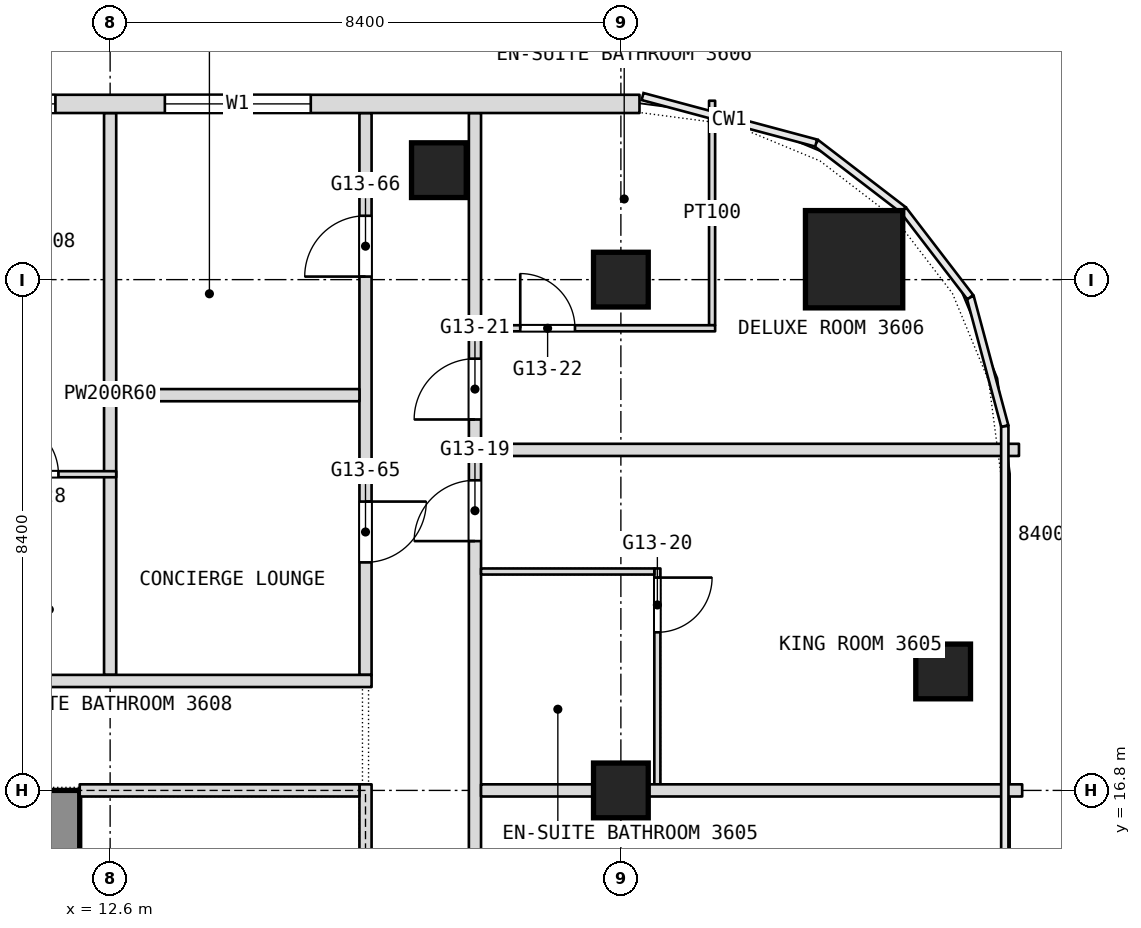
"""IFC4 building model, lengths in metres.
Left out: names, types, materials, properties, quantities, classifications, styles, units other than length and angle.
Written with IfcOpenShell. Run it as: python <this file> out.ifc"""

import sys

from ifc_helpers import new_model, si_unit, direction, frame, frame_2d, origin, origin_2d, place, context, subcontext, project, spatial, rectangle, extrude, element, fill, save


model = new_model("IFC4")
c1 = context("Model", 3, precision=1e-05, world=origin(), true_north=direction((0.0, 1.0)))
c2 = subcontext(c1, "Body", "Model", "MODEL_VIEW")
j1 = project(units=[si_unit("LENGTHUNIT", "METRE"), si_unit("PLANEANGLEUNIT", "RADIAN")], contexts=[c1])
p1 = place(None, origin())
s1 = spatial("IfcSite", under=j1, at=p1, CompositionType="ELEMENT")
p2 = place(p1, origin())
s2 = spatial("IfcBuilding", under=s1, at=p2, CompositionType="ELEMENT")
p3 = place(p2, frame((0.0, 0.0, 155.3)))
s3 = spatial("IfcBuildingStorey", under=s2, at=p3, CompositionType="ELEMENT", Elevation=155.3)
p4 = place(p3, frame((11.6, 0.0, 0.0), z_axis=(0.0, 0.0, 1.0), x_axis=(0.0, 1.0, 0.0)))
e1 = element("IfcWall", 1, at=p4, inside=s3, PredefinedType="SHEAR", context=c2, shape_type="SweptSolid", body=[
    extrude(rectangle(XDim=16.8, YDim=1.0, at=frame_2d((8.4, 0.0))), origin(), (0.0, 0.0, 1.0), 3.6),
])
p5 = place(p4, frame((2.3, 0.0, 0.0)))
e2 = element("IfcOpeningElement", 2, at=p5, cuts=e1, PredefinedType="OPENING", context=c2, shape_type="SweptSolid", body=[
    extrude(rectangle(XDim=1.1, YDim=2.1, at=frame_2d((0.55, 1.05))), frame((0.0, 0.5, 0.0), z_axis=(0.0, -1.0, 0.0), x_axis=(1.0, 0.0, 0.0)), (0.0, 0.0, 1.0), 1.0),
])
p6 = place(p4, frame((4.85, 0.0, 0.0)))
e3 = element("IfcOpeningElement", 3, at=p6, cuts=e1, PredefinedType="OPENING", context=c2, shape_type="SweptSolid", body=[
    extrude(rectangle(XDim=1.1, YDim=2.1, at=frame_2d((0.55, 1.05))), frame((0.0, 0.5, 0.0), z_axis=(0.0, -1.0, 0.0), x_axis=(1.0, 0.0, 0.0)), (0.0, 0.0, 1.0), 1.0),
])
p7 = place(p4, frame((6.825, 0.0, 0.0)))
e4 = element("IfcOpeningElement", 4, at=p7, cuts=e1, PredefinedType="OPENING", context=c2, shape_type="SweptSolid", body=[
    extrude(rectangle(XDim=1.2, YDim=2.1, at=frame_2d((0.6, 1.05))), frame((0.0, 0.5, 0.0), z_axis=(0.0, -1.0, 0.0), x_axis=(1.0, 0.0, 0.0)), (0.0, 0.0, 1.0), 1.0),
])
p8 = place(p4, frame((13.4, 0.0, 0.0)))
e5 = element("IfcOpeningElement", 5, at=p8, cuts=e1, PredefinedType="OPENING", context=c2, shape_type="SweptSolid", body=[
    extrude(rectangle(XDim=1.1, YDim=2.1, at=frame_2d((0.55, 1.05))), frame((0.0, 0.5, 0.0), z_axis=(0.0, -1.0, 0.0), x_axis=(1.0, 0.0, 0.0)), (0.0, 0.0, 1.0), 1.0),
])
p9 = place(p4, frame((10.85, 0.0, 0.0)))
e6 = element("IfcOpeningElement", 6, at=p9, cuts=e1, PredefinedType="OPENING", context=c2, shape_type="SweptSolid", body=[
    extrude(rectangle(XDim=1.1, YDim=2.1, at=frame_2d((0.55, 1.05))), frame((0.0, 0.5, 0.0), z_axis=(0.0, -1.0, 0.0), x_axis=(1.0, 0.0, 0.0)), (0.0, 0.0, 1.0), 1.0),
])
p10 = place(p4, frame((8.775, 0.0, 0.0)))
e7 = element("IfcOpeningElement", 7, at=p10, cuts=e1, PredefinedType="OPENING", context=c2, shape_type="SweptSolid", body=[
    extrude(rectangle(XDim=1.2, YDim=2.1, at=frame_2d((0.6, 1.05))), frame((0.0, 0.5, 0.0), z_axis=(0.0, -1.0, 0.0), x_axis=(1.0, 0.0, 0.0)), (0.0, 0.0, 1.0), 1.0),
])
p11 = place(p3, frame((24.835, 25.535, 0.0), z_axis=(0.0, 0.0, 1.0), x_axis=(1.0, 0.0, 0.0)))
e8 = element("IfcColumn", 8, at=p11, inside=s3, PredefinedType="COLUMN", context=c2, shape_type="SweptSolid", body=[
    extrude(rectangle(XDim=1.6, YDim=1.6, at=origin_2d()), origin(), (0.0, 0.0, 1.0), 3.6),
])
for number, where, z_axis, x_axis in (
    (9, (21.0, 16.8, 0.0), (0.0, 0.0, 1.0), (1.0, 0.0, 0.0)),
    (10, (21.0, 25.2, 0.0), (0.0, 0.0, 1.0), (1.0, 0.0, 0.0)),
    (11, (18.007, 27.0, 0.0), (0.0, 0.0, 1.0), (1.0, 0.0, 0.0)),
    (12, (26.3, 18.756, 0.0), (0.0, 0.0, 1.0), (1.0, 0.0, 0.0)),
):
    element("IfcColumn", number, at=place(p3, frame(where, z_axis=z_axis, x_axis=x_axis)), inside=s3, PredefinedType="COLUMN", context=c2, shape_type="SweptSolid", body=[
        extrude(rectangle(XDim=0.9, YDim=0.9, at=origin_2d()), origin(), (0.0, 0.0, 1.0), 3.6),
    ])
p12 = place(p3, frame((22.5, 24.45, 0.0), z_axis=(0.0, 0.0, 1.0), x_axis=(0.0, 1.0, 0.0)))
e13 = element("IfcWall", 13, at=p12, inside=s3, PredefinedType="PARTITIONING", context=c2, shape_type="SweptSolid", body=[
    extrude(rectangle(XDim=3.692, YDim=0.1, at=frame_2d((1.846, 0.0))), origin(), (0.0, 0.0, 1.0), 3.34),
])
p13 = place(p3, frame((21.6, 16.9, 0.0), z_axis=(0.0, 0.0, 1.0), x_axis=(0.0, 1.0, 0.0)))
e14 = element("IfcWall", 14, at=p13, inside=s3, PredefinedType="PARTITIONING", context=c2, shape_type="SweptSolid", body=[
    extrude(rectangle(XDim=3.55, YDim=0.1, at=frame_2d((1.775, 0.0))), origin(), (0.0, 0.0, 1.0), 3.34),
])
p14 = place(p13, frame((2.5, 0.0, 0.0)))
e15 = element("IfcOpeningElement", 15, at=p14, cuts=e14, PredefinedType="OPENING", context=c2, shape_type="SweptSolid", body=[
    extrude(rectangle(XDim=0.9, YDim=2.1, at=frame_2d((0.45, 1.05))), frame((0.0, 0.05, 0.0), z_axis=(0.0, -1.0, 0.0), x_axis=(1.0, 0.0, 0.0)), (0.0, 0.0, 1.0), 0.1),
])
p15 = place(p3, frame((18.6, -21.708, 0.0), z_axis=(0.0, 0.0, 1.0), x_axis=(0.0, 1.0, 0.0)))
e16 = element("IfcWall", 16, at=p15, inside=s3, PredefinedType="PARTITIONING", context=c2, shape_type="SweptSolid", body=[
    extrude(rectangle(XDim=49.648, YDim=0.2, at=frame_2d((24.824, 0.0))), origin(), (0.0, 0.0, 1.0), 3.34),
])
p16 = place(p15, frame((2.8, 0.0, 0.0)))
e17 = element("IfcOpeningElement", 17, at=p16, cuts=e16, PredefinedType="OPENING", context=c2, shape_type="SweptSolid", body=[
    extrude(rectangle(XDim=1.0, YDim=2.1, at=frame_2d((0.5, 1.05))), frame((0.0, 0.1, 0.0), z_axis=(0.0, -1.0, 0.0), x_axis=(1.0, 0.0, 0.0)), (0.0, 0.0, 1.0), 0.2),
])
p17 = place(p15, frame((10.658, 0.0, 0.0)))
e18 = element("IfcOpeningElement", 18, at=p17, cuts=e16, PredefinedType="OPENING", context=c2, shape_type="SweptSolid", body=[
    extrude(rectangle(XDim=1.1, YDim=2.1, at=frame_2d((0.55, 1.05))), frame((0.0, 0.1, 0.0), z_axis=(0.0, -1.0, 0.0), x_axis=(1.0, 0.0, 0.0)), (0.0, 0.0, 1.0), 0.2),
])
p18 = place(p15, frame((16.608, 0.0, 0.0)))
e19 = element("IfcOpeningElement", 19, at=p18, cuts=e16, PredefinedType="OPENING", context=c2, shape_type="SweptSolid", body=[
    extrude(rectangle(XDim=1.8, YDim=2.1, at=frame_2d((0.9, 1.05))), frame((0.0, 0.1, 0.0), z_axis=(0.0, -1.0, 0.0), x_axis=(1.0, 0.0, 0.0)), (0.0, 0.0, 1.0), 0.2),
])
p19 = place(p15, frame((24.508, 0.0, 0.0)))
e20 = element("IfcOpeningElement", 20, at=p19, cuts=e16, PredefinedType="OPENING", context=c2, shape_type="SweptSolid", body=[
    extrude(rectangle(XDim=1.0, YDim=2.1, at=frame_2d((0.5, 1.05))), frame((0.0, 0.1, 0.0), z_axis=(0.0, -1.0, 0.0), x_axis=(1.0, 0.0, 0.0)), (0.0, 0.0, 1.0), 0.2),
])
p20 = place(p15, frame((26.308, 0.0, 0.0)))
e21 = element("IfcOpeningElement", 21, at=p20, cuts=e16, PredefinedType="OPENING", context=c2, shape_type="SweptSolid", body=[
    extrude(rectangle(XDim=1.0, YDim=2.1, at=frame_2d((0.5, 1.05))), frame((0.0, 0.1, 0.0), z_axis=(0.0, -1.0, 0.0), x_axis=(1.0, 0.0, 0.0)), (0.0, 0.0, 1.0), 0.2),
])
p21 = place(p15, frame((33.408, 0.0, 0.0)))
e22 = element("IfcOpeningElement", 22, at=p21, cuts=e16, PredefinedType="OPENING", context=c2, shape_type="SweptSolid", body=[
    extrude(rectangle(XDim=1.8, YDim=2.1, at=frame_2d((0.9, 1.05))), frame((0.0, 0.1, 0.0), z_axis=(0.0, -1.0, 0.0), x_axis=(1.0, 0.0, 0.0)), (0.0, 0.0, 1.0), 0.2),
])
p22 = place(p15, frame((42.608, 0.0, 0.0)))
e23 = element("IfcOpeningElement", 23, at=p22, cuts=e16, PredefinedType="OPENING", context=c2, shape_type="SweptSolid", body=[
    extrude(rectangle(XDim=1.0, YDim=2.1, at=frame_2d((0.5, 1.05))), frame((0.0, 0.1, 0.0), z_axis=(0.0, -1.0, 0.0), x_axis=(1.0, 0.0, 0.0)), (0.0, 0.0, 1.0), 0.2),
])
p23 = place(p15, frame((44.608, 0.0, 0.0)))
e24 = element("IfcOpeningElement", 24, at=p23, cuts=e16, PredefinedType="OPENING", context=c2, shape_type="SweptSolid", body=[
    extrude(rectangle(XDim=1.0, YDim=2.1, at=frame_2d((0.5, 1.05))), frame((0.0, 0.1, 0.0), z_axis=(0.0, -1.0, 0.0), x_axis=(1.0, 0.0, 0.0)), (0.0, 0.0, 1.0), 0.2),
])
p24 = place(p3, frame((16.8, 18.7, 0.0), z_axis=(0.0, 0.0, 1.0), x_axis=(0.0, 1.0, 0.0)))
e25 = element("IfcWall", 25, at=p24, inside=s3, PredefinedType="PARTITIONING", context=c2, shape_type="SweptSolid", body=[
    extrude(rectangle(XDim=9.24, YDim=0.2, at=frame_2d((4.62, 0.0))), origin(), (0.0, 0.0, 1.0), 3.34),
])
p25 = place(p24, frame((1.85, 0.0, 0.0)))
e26 = element("IfcOpeningElement", 26, at=p25, cuts=e25, PredefinedType="OPENING", context=c2, shape_type="SweptSolid", body=[
    extrude(rectangle(XDim=1.0, YDim=2.1, at=frame_2d((0.5, 1.05))), frame((0.0, 0.1, 0.0), z_axis=(0.0, -1.0, 0.0), x_axis=(1.0, 0.0, 0.0)), (0.0, 0.0, 1.0), 0.2),
])
p26 = place(p24, frame((6.55, 0.0, 0.0)))
e27 = element("IfcOpeningElement", 27, at=p26, cuts=e25, PredefinedType="OPENING", context=c2, shape_type="SweptSolid", body=[
    extrude(rectangle(XDim=1.0, YDim=2.1, at=frame_2d((0.5, 1.05))), frame((0.0, 0.1, 0.0), z_axis=(0.0, -1.0, 0.0), x_axis=(1.0, 0.0, 0.0)), (0.0, 0.0, 1.0), 0.2),
])
p27 = place(p3, frame((12.6, 18.7, 0.0), z_axis=(0.0, 0.0, 1.0), x_axis=(0.0, 1.0, 0.0)))
e28 = element("IfcWall", 28, at=p27, inside=s3, PredefinedType="PARTITIONING", context=c2, shape_type="SweptSolid", body=[
    extrude(rectangle(XDim=9.24, YDim=0.2, at=frame_2d((4.62, 0.0))), origin(), (0.0, 0.0, 1.0), 3.34),
])
p28 = place(p3, frame((18.7, 16.8, 0.0), z_axis=(0.0, 0.0, 1.0), x_axis=(1.0, 0.0, 0.0)))
e29 = element("IfcWall", 29, at=p28, inside=s3, PredefinedType="PARTITIONING", context=c2, shape_type="SweptSolid", body=[
    extrude(rectangle(XDim=8.9, YDim=0.2, at=frame_2d((4.45, 0.0))), origin(), (0.0, 0.0, 1.0), 2.89),
])
p29 = place(p3, frame((10.7, 18.6, 0.0), z_axis=(0.0, 0.0, 1.0), x_axis=(1.0, 0.0, 0.0)))
e30 = element("IfcWall", 30, at=p29, inside=s3, PredefinedType="PARTITIONING", context=c2, shape_type="SweptSolid", body=[
    extrude(rectangle(XDim=6.2, YDim=0.2, at=frame_2d((3.1, 0.0))), origin(), (0.0, 0.0, 1.0), 3.34),
])
p30 = place(p3, frame((18.7, 20.4, 0.0), z_axis=(0.0, 0.0, 1.0), x_axis=(1.0, 0.0, 0.0)))
e31 = element("IfcWall", 31, at=p30, inside=s3, PredefinedType="PARTITIONING", context=c2, shape_type="SweptSolid", body=[
    extrude(rectangle(XDim=2.85, YDim=0.1, at=frame_2d((1.425, 0.0))), origin(), (0.0, 0.0, 1.0), 3.34),
])
p31 = place(p3, frame((10.7, 22.0, 0.0), z_axis=(0.0, 0.0, 1.0), x_axis=(1.0, 0.0, 0.0)))
e32 = element("IfcWall", 32, at=p31, inside=s3, PredefinedType="PARTITIONING", context=c2, shape_type="SweptSolid", body=[
    extrude(rectangle(XDim=2.0, YDim=0.1, at=frame_2d((1.0, 0.0))), origin(), (0.0, 0.0, 1.0), 3.34),
])
p32 = place(p31, frame((0.15, 0.0, 0.0)))
e33 = element("IfcOpeningElement", 33, at=p32, cuts=e32, PredefinedType="OPENING", context=c2, shape_type="SweptSolid", body=[
    extrude(rectangle(XDim=0.9, YDim=2.1, at=frame_2d((0.45, 1.05))), frame((0.0, 0.05, 0.0), z_axis=(0.0, -1.0, 0.0), x_axis=(1.0, 0.0, 0.0)), (0.0, 0.0, 1.0), 0.1),
])
p33 = place(p3, frame((18.7, 22.4, 0.0), z_axis=(0.0, 0.0, 1.0), x_axis=(1.0, 0.0, 0.0)))
e34 = element("IfcWall", 34, at=p33, inside=s3, PredefinedType="PARTITIONING", context=c2, shape_type="SweptSolid", body=[
    extrude(rectangle(XDim=8.847, YDim=0.2, at=frame_2d((4.424, 0.0))), origin(), (0.0, 0.0, 1.0), 3.34),
])
p34 = place(p3, frame((12.7, 23.3, 0.0), z_axis=(0.0, 0.0, 1.0), x_axis=(1.0, 0.0, 0.0)))
e35 = element("IfcWall", 35, at=p34, inside=s3, PredefinedType="PARTITIONING", context=c2, shape_type="SweptSolid", body=[
    extrude(rectangle(XDim=4.0, YDim=0.2, at=frame_2d((2.0, 0.0))), origin(), (0.0, 0.0, 1.0), 3.34),
])
p35 = place(p3, frame((18.7, 24.4, 0.0), z_axis=(0.0, 0.0, 1.0), x_axis=(1.0, 0.0, 0.0)))
e36 = element("IfcWall", 36, at=p35, inside=s3, PredefinedType="PARTITIONING", context=c2, shape_type="SweptSolid", body=[
    extrude(rectangle(XDim=3.85, YDim=0.1, at=frame_2d((1.925, 0.0))), origin(), (0.0, 0.0, 1.0), 3.34),
])
p36 = place(p35, frame((0.645, 0.0, 0.0)))
e37 = element("IfcOpeningElement", 37, at=p36, cuts=e36, PredefinedType="OPENING", context=c2, shape_type="SweptSolid", body=[
    extrude(rectangle(XDim=0.9, YDim=2.1, at=frame_2d((0.45, 1.05))), frame((0.0, 0.05, 0.0), z_axis=(0.0, -1.0, 0.0), x_axis=(1.0, 0.0, 0.0)), (0.0, 0.0, 1.0), 0.1),
])
p37 = place(p3, frame((21.306, 28.09, 0.0), z_axis=(0.0, 0.0, 1.0), x_axis=(-1.0, 0.0, 0.0)))
e38 = element("IfcWall", 38, at=p37, inside=s3, PredefinedType="NOTDEFINED", context=c2, shape_type="SweptSolid", body=[
    extrude(rectangle(XDim=42.612, YDim=0.3, at=frame_2d((21.306, 0.0))), origin(), (0.0, 0.0, 1.0), 3.6),
])
p38 = place(p37, frame((5.406, 0.0, 0.9)))
e39 = element("IfcOpeningElement", 39, at=p38, cuts=e38, PredefinedType="OPENING", context=c2, shape_type="SweptSolid", body=[
    extrude(rectangle(XDim=2.4, YDim=2.1, at=frame_2d((1.2, 1.05))), frame((0.0, 0.15, 0.0), z_axis=(0.0, -1.0, 0.0), x_axis=(1.0, 0.0, 0.0)), (0.0, 0.0, 1.0), 0.3),
])
p39 = place(p37, frame((9.606, 0.0, 0.9)))
e40 = element("IfcOpeningElement", 40, at=p39, cuts=e38, PredefinedType="OPENING", context=c2, shape_type="SweptSolid", body=[
    extrude(rectangle(XDim=2.4, YDim=2.1, at=frame_2d((1.2, 1.05))), frame((0.0, 0.15, 0.0), z_axis=(0.0, -1.0, 0.0), x_axis=(1.0, 0.0, 0.0)), (0.0, 0.0, 1.0), 0.3),
])
p40 = place(p37, frame((13.806, 0.0, 0.9)))
e41 = element("IfcOpeningElement", 41, at=p40, cuts=e38, PredefinedType="OPENING", context=c2, shape_type="SweptSolid", body=[
    extrude(rectangle(XDim=2.4, YDim=2.1, at=frame_2d((1.2, 1.05))), frame((0.0, 0.15, 0.0), z_axis=(0.0, -1.0, 0.0), x_axis=(1.0, 0.0, 0.0)), (0.0, 0.0, 1.0), 0.3),
])
p41 = place(p37, frame((18.006, 0.0, 0.9)))
e42 = element("IfcOpeningElement", 42, at=p41, cuts=e38, PredefinedType="OPENING", context=c2, shape_type="SweptSolid", body=[
    extrude(rectangle(XDim=2.4, YDim=2.1, at=frame_2d((1.2, 1.05))), frame((0.0, 0.15, 0.0), z_axis=(0.0, -1.0, 0.0), x_axis=(1.0, 0.0, 0.0)), (0.0, 0.0, 1.0), 0.3),
])
p42 = place(p37, frame((22.206, 0.0, 0.9)))
e43 = element("IfcOpeningElement", 43, at=p42, cuts=e38, PredefinedType="OPENING", context=c2, shape_type="SweptSolid", body=[
    extrude(rectangle(XDim=2.4, YDim=2.1, at=frame_2d((1.2, 1.05))), frame((0.0, 0.15, 0.0), z_axis=(0.0, -1.0, 0.0), x_axis=(1.0, 0.0, 0.0)), (0.0, 0.0, 1.0), 0.3),
])
p43 = place(p37, frame((26.406, 0.0, 0.9)))
e44 = element("IfcOpeningElement", 44, at=p43, cuts=e38, PredefinedType="OPENING", context=c2, shape_type="SweptSolid", body=[
    extrude(rectangle(XDim=2.4, YDim=2.1, at=frame_2d((1.2, 1.05))), frame((0.0, 0.15, 0.0), z_axis=(0.0, -1.0, 0.0), x_axis=(1.0, 0.0, 0.0)), (0.0, 0.0, 1.0), 0.3),
])
p44 = place(p37, frame((30.606, 0.0, 0.9)))
e45 = element("IfcOpeningElement", 45, at=p44, cuts=e38, PredefinedType="OPENING", context=c2, shape_type="SweptSolid", body=[
    extrude(rectangle(XDim=2.4, YDim=2.1, at=frame_2d((1.2, 1.05))), frame((0.0, 0.15, 0.0), z_axis=(0.0, -1.0, 0.0), x_axis=(1.0, 0.0, 0.0)), (0.0, 0.0, 1.0), 0.3),
])
p45 = place(p37, frame((34.806, 0.0, 0.9)))
e46 = element("IfcOpeningElement", 46, at=p45, cuts=e38, PredefinedType="OPENING", context=c2, shape_type="SweptSolid", body=[
    extrude(rectangle(XDim=2.4, YDim=2.1, at=frame_2d((1.2, 1.05))), frame((0.0, 0.15, 0.0), z_axis=(0.0, -1.0, 0.0), x_axis=(1.0, 0.0, 0.0)), (0.0, 0.0, 1.0), 0.3),
])
p46 = place(p3, frame((16.8, -0.1, 0.0), z_axis=(0.0, 0.0, 1.0), x_axis=(0.0, 1.0, 0.0)))
e47 = element("IfcWall", 47, at=p46, inside=s3, PredefinedType="PARTITIONING", context=c2, shape_type="SweptSolid", body=[
    extrude(rectangle(XDim=17.0, YDim=0.2, at=frame_2d((8.5, 0.0))), origin(), (0.0, 0.0, 1.0), 3.34),
])
p47 = place(p46, frame((2.2, 0.0, 0.0)))
e48 = element("IfcOpeningElement", 48, at=p47, cuts=e47, PredefinedType="OPENING", context=c2, shape_type="SweptSolid", body=[
    extrude(rectangle(XDim=1.8, YDim=2.1, at=frame_2d((0.9, 1.05))), frame((0.0, 0.1, 0.0), z_axis=(0.0, -1.0, 0.0), x_axis=(1.0, 0.0, 0.0)), (0.0, 0.0, 1.0), 0.2),
])
p48 = place(p46, frame((13.0, 0.0, 0.0)))
e49 = element("IfcOpeningElement", 49, at=p48, cuts=e47, PredefinedType="OPENING", context=c2, shape_type="SweptSolid", body=[
    extrude(rectangle(XDim=1.8, YDim=2.1, at=frame_2d((0.9, 1.05))), frame((0.0, 0.1, 0.0), z_axis=(0.0, -1.0, 0.0), x_axis=(1.0, 0.0, 0.0)), (0.0, 0.0, 1.0), 0.2),
])
p49 = place(p3, frame((12.1, 16.8, 0.0), z_axis=(0.0, 0.0, 1.0), x_axis=(1.0, 0.0, 0.0)))
e50 = element("IfcWall", 50, at=p49, inside=s3, PredefinedType="PARTITIONING", context=c2, shape_type="SweptSolid", body=[
    extrude(rectangle(XDim=4.6, YDim=0.2, at=frame_2d((2.3, 0.0))), origin(), (0.0, 0.0, 1.0), 2.89),
])
p50 = place(p14, origin())
e51 = element("IfcDoor", 51, at=p50, inside=s3, OperationType="SINGLE_SWING_RIGHT", PredefinedType="DOOR", context=c2, shape_type="SweptSolid", body=[
    extrude(rectangle(XDim=0.9, YDim=2.1, at=frame_2d((0.45, 1.05))), frame((0.0, 0.025, 0.0), z_axis=(0.0, -1.0, 0.0), x_axis=(1.0, 0.0, 0.0)), (0.0, 0.0, 1.0), 0.05),
])
fill(e15, e51)
p51 = place(p22, origin())
e52 = element("IfcDoor", 52, at=p51, inside=s3, OperationType="SINGLE_SWING_LEFT", PredefinedType="DOOR", context=c2, shape_type="SweptSolid", body=[
    extrude(rectangle(XDim=1.0, YDim=2.1, at=frame_2d((0.5, 1.05))), frame((0.0, 0.025, 0.0), z_axis=(0.0, -1.0, 0.0), x_axis=(1.0, 0.0, 0.0)), (0.0, 0.0, 1.0), 0.05),
])
fill(e23, e52)
p52 = place(p23, origin())
e53 = element("IfcDoor", 53, at=p52, inside=s3, OperationType="SINGLE_SWING_LEFT", PredefinedType="DOOR", context=c2, shape_type="SweptSolid", body=[
    extrude(rectangle(XDim=1.0, YDim=2.1, at=frame_2d((0.5, 1.05))), frame((0.0, 0.025, 0.0), z_axis=(0.0, -1.0, 0.0), x_axis=(1.0, 0.0, 0.0)), (0.0, 0.0, 1.0), 0.05),
])
fill(e24, e53)
p53 = place(p25, origin())
e54 = element("IfcDoor", 54, at=p53, inside=s3, OperationType="SINGLE_SWING_LEFT", PredefinedType="DOOR", context=c2, shape_type="SweptSolid", body=[
    extrude(rectangle(XDim=1.0, YDim=2.1, at=frame_2d((0.5, 1.05))), frame((0.0, 0.025, 0.0), z_axis=(0.0, -1.0, 0.0), x_axis=(1.0, 0.0, 0.0)), (0.0, 0.0, 1.0), 0.05),
])
fill(e26, e54)
p54 = place(p26, origin())
e55 = element("IfcDoor", 55, at=p54, inside=s3, OperationType="SINGLE_SWING_LEFT", PredefinedType="DOOR", context=c2, shape_type="SweptSolid", body=[
    extrude(rectangle(XDim=1.0, YDim=2.1, at=frame_2d((0.5, 1.05))), frame((0.0, 0.025, 0.0), z_axis=(0.0, -1.0, 0.0), x_axis=(1.0, 0.0, 0.0)), (0.0, 0.0, 1.0), 0.05),
])
fill(e27, e55)
p55 = place(p32, origin())
e56 = element("IfcDoor", 56, at=p55, inside=s3, OperationType="SINGLE_SWING_RIGHT", PredefinedType="DOOR", context=c2, shape_type="SweptSolid", body=[
    extrude(rectangle(XDim=0.9, YDim=2.1, at=frame_2d((0.45, 1.05))), frame((0.0, 0.025, 0.0), z_axis=(0.0, -1.0, 0.0), x_axis=(1.0, 0.0, 0.0)), (0.0, 0.0, 1.0), 0.05),
])
fill(e33, e56)
p56 = place(p36, origin())
e57 = element("IfcDoor", 57, at=p56, inside=s3, OperationType="SINGLE_SWING_RIGHT", PredefinedType="DOOR", context=c2, shape_type="SweptSolid", body=[
    extrude(rectangle(XDim=0.9, YDim=2.1, at=frame_2d((0.45, 1.05))), frame((0.0, 0.025, 0.0), z_axis=(0.0, -1.0, 0.0), x_axis=(1.0, 0.0, 0.0)), (0.0, 0.0, 1.0), 0.05),
])
fill(e37, e57)
p57 = place(p38, origin())
e58 = element("IfcWindow", 58, at=p57, inside=s3, PartitioningType="SINGLE_PANEL", PredefinedType="WINDOW", context=c2, shape_type="SweptSolid", body=[
    extrude(rectangle(XDim=2.4, YDim=2.1, at=frame_2d((1.2, 1.05))), frame((0.0, 0.03, 0.0), z_axis=(0.0, -1.0, 0.0), x_axis=(1.0, 0.0, 0.0)), (0.0, 0.0, 1.0), 0.06),
])
fill(e39, e58)
p58 = place(p39, origin())
e59 = element("IfcWindow", 59, at=p58, inside=s3, PartitioningType="SINGLE_PANEL", PredefinedType="WINDOW", context=c2, shape_type="SweptSolid", body=[
    extrude(rectangle(XDim=2.4, YDim=2.1, at=frame_2d((1.2, 1.05))), frame((0.0, 0.03, 0.0), z_axis=(0.0, -1.0, 0.0), x_axis=(1.0, 0.0, 0.0)), (0.0, 0.0, 1.0), 0.06),
])
fill(e40, e59)
save(model, sys.argv[1])
